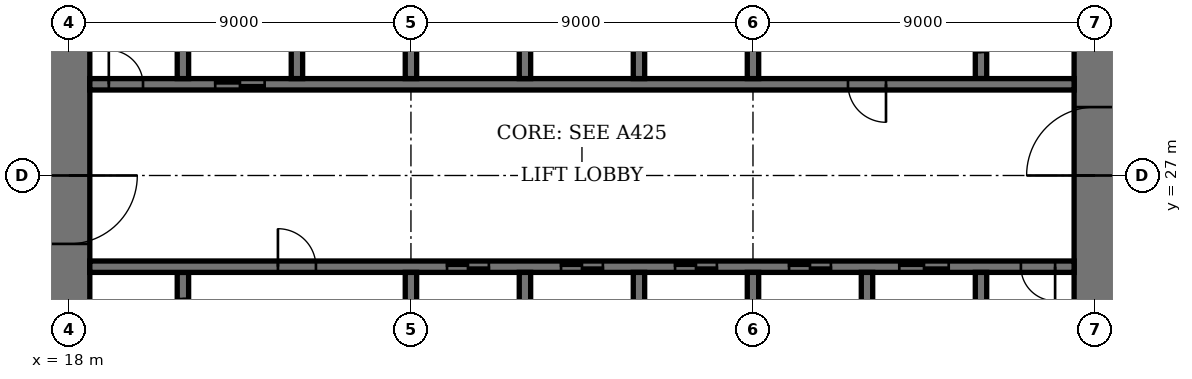
"""IFC4 building model, lengths in metres.
Left out: names, types, materials, properties, quantities, classifications, styles, units other than length and angle.
Written with IfcOpenShell. Run it as: python <this file> out.ifc"""

import sys

from ifc_helpers import new_model, si_unit, direction, frame, frame_2d, origin, place, context, subcontext, project, spatial, rectangle, extrude, element, fill, save


model = new_model("IFC4")
c1 = context("Model", 3, precision=1e-05, world=origin(), true_north=direction((0.0, 1.0)))
c2 = subcontext(c1, "Body", "Model", "MODEL_VIEW")
j1 = project(units=[si_unit("LENGTHUNIT", "METRE"), si_unit("PLANEANGLEUNIT", "RADIAN")], contexts=[c1])
p1 = place(None, origin())
s1 = spatial("IfcSite", under=j1, at=p1, CompositionType="ELEMENT")
p2 = place(p1, origin())
s2 = spatial("IfcBuilding", under=s1, at=p2, CompositionType="ELEMENT")
p3 = place(p2, frame((0.0, 0.0, 75.8)))
s3 = spatial("IfcBuildingStorey", under=s2, at=p3, CompositionType="ELEMENT", Elevation=75.8)
p4 = place(p3, frame((18.0, 35.45, 0.0), z_axis=(0.0, 0.0, 1.0), x_axis=(0.0, -1.0, 0.0)))
e1 = element("IfcWall", 1, at=p4, inside=s3, PredefinedType="SHEAR", context=c2, shape_type="SweptSolid", body=[
    extrude(rectangle(XDim=16.9, YDim=1.1, at=frame_2d((8.45, 0.0))), origin(), (0.0, 0.0, 1.0), 4.2),
])
p5 = place(p4, frame((8.45, 0.0, 0.0)))
e2 = element("IfcOpeningElement", 2, at=p5, cuts=e1, PredefinedType="OPENING", context=c2, shape_type="SweptSolid", body=[
    extrude(rectangle(XDim=1.8, YDim=2.4, at=frame_2d((0.9, 1.2))), frame((0.0, 0.56, 0.0), z_axis=(0.0, -1.0, 0.0), x_axis=(1.0, 0.0, 0.0)), (0.0, 0.0, 1.0), 1.12),
])
p6 = place(p3, frame((45.0, 18.55, 0.0), z_axis=(0.0, 0.0, 1.0), x_axis=(0.0, 1.0, 0.0)))
e3 = element("IfcWall", 3, at=p6, inside=s3, PredefinedType="SHEAR", context=c2, shape_type="SweptSolid", body=[
    extrude(rectangle(XDim=16.9, YDim=1.1, at=frame_2d((8.45, 0.0))), origin(), (0.0, 0.0, 1.0), 4.2),
])
p7 = place(p6, frame((8.45, 0.0, 0.0)))
e4 = element("IfcOpeningElement", 4, at=p7, cuts=e3, PredefinedType="OPENING", context=c2, shape_type="SweptSolid", body=[
    extrude(rectangle(XDim=1.8, YDim=2.4, at=frame_2d((0.9, 1.2))), frame((0.0, 0.56, 0.0), z_axis=(0.0, -1.0, 0.0), x_axis=(1.0, 0.0, 0.0)), (0.0, 0.0, 1.0), 1.12),
])
p8 = place(p3, frame((21.0, 21.95, 0.0), z_axis=(0.0, 0.0, 1.0), x_axis=(0.0, 1.0, 0.0)))
e5 = element("IfcWall", 5, at=p8, inside=s3, PredefinedType="SHEAR", context=c2, shape_type="SweptSolid", body=[
    extrude(rectangle(XDim=2.5, YDim=0.3, at=frame_2d((1.25, 0.0))), origin(), (0.0, 0.0, 1.0), 4.2),
])
p9 = place(p8, frame((0.7, 0.0, 0.0)))
e6 = element("IfcOpeningElement", 6, at=p9, cuts=e5, PredefinedType="OPENING", context=c2, shape_type="SweptSolid", body=[
    extrude(rectangle(XDim=1.1, YDim=2.4, at=frame_2d((0.55, 1.2))), frame((0.0, 0.16, 0.0), z_axis=(0.0, -1.0, 0.0), x_axis=(1.0, 0.0, 0.0)), (0.0, 0.0, 1.0), 0.32),
])
p10 = place(p3, frame((42.0, 29.55, 0.0), z_axis=(0.0, 0.0, 1.0), x_axis=(0.0, 1.0, 0.0)))
e7 = element("IfcWall", 7, at=p10, inside=s3, PredefinedType="SHEAR", context=c2, shape_type="SweptSolid", body=[
    extrude(rectangle(XDim=2.5, YDim=0.3, at=frame_2d((1.25, 0.0))), origin(), (0.0, 0.0, 1.0), 4.2),
])
p11 = place(p10, frame((0.7, 0.0, 0.0)))
e8 = element("IfcOpeningElement", 8, at=p11, cuts=e7, PredefinedType="OPENING", context=c2, shape_type="SweptSolid", body=[
    extrude(rectangle(XDim=1.1, YDim=2.4, at=frame_2d((0.55, 1.2))), frame((0.0, 0.16, 0.0), z_axis=(0.0, -1.0, 0.0), x_axis=(1.0, 0.0, 0.0)), (0.0, 0.0, 1.0), 0.32),
])
p12 = place(p3, frame((18.55, 24.6, 0.0), z_axis=(0.0, 0.0, 1.0), x_axis=(1.0, 0.0, 0.0)))
e9 = element("IfcWall", 9, at=p12, inside=s3, PredefinedType="SHEAR", context=c2, shape_type="SweptSolid", body=[
    extrude(rectangle(XDim=25.9, YDim=0.3, at=frame_2d((12.95, 0.0))), origin(), (0.0, 0.0, 1.0), 4.2),
])
p13 = place(p12, frame((4.95, 0.0, 0.0)))
e10 = element("IfcOpeningElement", 10, at=p13, cuts=e9, PredefinedType="OPENING", context=c2, shape_type="SweptSolid", body=[
    extrude(rectangle(XDim=1.0, YDim=2.4, at=frame_2d((0.5, 1.2))), frame((0.0, 0.16, 0.0), z_axis=(0.0, -1.0, 0.0), x_axis=(1.0, 0.0, 0.0)), (0.0, 0.0, 1.0), 0.32),
])
p14 = place(p12, frame((24.5, 0.0, 0.0)))
e11 = element("IfcOpeningElement", 11, at=p14, cuts=e9, PredefinedType="OPENING", context=c2, shape_type="SweptSolid", body=[
    extrude(rectangle(XDim=0.9, YDim=2.1, at=frame_2d((0.45, 1.05))), frame((0.0, 0.16, 0.0), z_axis=(0.0, -1.0, 0.0), x_axis=(1.0, 0.0, 0.0)), (0.0, 0.0, 1.0), 0.32),
])
p15 = place(p12, frame((9.4, 0.0, 0.0)))
e12 = element("IfcOpeningElement", 12, at=p15, cuts=e9, PredefinedType="OPENING", context=c2, shape_type="SweptSolid", body=[
    extrude(rectangle(XDim=1.1, YDim=2.4, at=frame_2d((0.55, 1.2))), frame((0.0, 0.16, 0.0), z_axis=(0.0, -1.0, 0.0), x_axis=(1.0, 0.0, 0.0)), (0.0, 0.0, 1.0), 0.32),
])
p16 = place(p12, frame((12.4, 0.0, 0.0)))
e13 = element("IfcOpeningElement", 13, at=p16, cuts=e9, PredefinedType="OPENING", context=c2, shape_type="SweptSolid", body=[
    extrude(rectangle(XDim=1.1, YDim=2.4, at=frame_2d((0.55, 1.2))), frame((0.0, 0.16, 0.0), z_axis=(0.0, -1.0, 0.0), x_axis=(1.0, 0.0, 0.0)), (0.0, 0.0, 1.0), 0.32),
])
p17 = place(p12, frame((15.4, 0.0, 0.0)))
e14 = element("IfcOpeningElement", 14, at=p17, cuts=e9, PredefinedType="OPENING", context=c2, shape_type="SweptSolid", body=[
    extrude(rectangle(XDim=1.1, YDim=2.4, at=frame_2d((0.55, 1.2))), frame((0.0, 0.16, 0.0), z_axis=(0.0, -1.0, 0.0), x_axis=(1.0, 0.0, 0.0)), (0.0, 0.0, 1.0), 0.32),
])
p18 = place(p12, frame((18.4, 0.0, 0.0)))
e15 = element("IfcOpeningElement", 15, at=p18, cuts=e9, PredefinedType="OPENING", context=c2, shape_type="SweptSolid", body=[
    extrude(rectangle(XDim=1.1, YDim=2.4, at=frame_2d((0.55, 1.2))), frame((0.0, 0.16, 0.0), z_axis=(0.0, -1.0, 0.0), x_axis=(1.0, 0.0, 0.0)), (0.0, 0.0, 1.0), 0.32),
])
p19 = place(p12, frame((21.3, 0.0, 0.0)))
e16 = element("IfcOpeningElement", 16, at=p19, cuts=e9, PredefinedType="OPENING", context=c2, shape_type="SweptSolid", body=[
    extrude(rectangle(XDim=1.3, YDim=2.4, at=frame_2d((0.65, 1.2))), frame((0.0, 0.16, 0.0), z_axis=(0.0, -1.0, 0.0), x_axis=(1.0, 0.0, 0.0)), (0.0, 0.0, 1.0), 0.32),
])
p20 = place(p3, frame((18.55, 29.4, 0.0), z_axis=(0.0, 0.0, 1.0), x_axis=(1.0, 0.0, 0.0)))
e17 = element("IfcWall", 17, at=p20, inside=s3, PredefinedType="SHEAR", context=c2, shape_type="SweptSolid", body=[
    extrude(rectangle(XDim=25.9, YDim=0.3, at=frame_2d((12.95, 0.0))), origin(), (0.0, 0.0, 1.0), 4.2),
])
p21 = place(p20, frame((19.95, 0.0, 0.0)))
e18 = element("IfcOpeningElement", 18, at=p21, cuts=e17, PredefinedType="OPENING", context=c2, shape_type="SweptSolid", body=[
    extrude(rectangle(XDim=1.0, YDim=2.4, at=frame_2d((0.5, 1.2))), frame((0.0, 0.16, 0.0), z_axis=(0.0, -1.0, 0.0), x_axis=(1.0, 0.0, 0.0)), (0.0, 0.0, 1.0), 0.32),
])
p22 = place(p20, frame((0.5, 0.0, 0.0)))
e19 = element("IfcOpeningElement", 19, at=p22, cuts=e17, PredefinedType="OPENING", context=c2, shape_type="SweptSolid", body=[
    extrude(rectangle(XDim=0.9, YDim=2.1, at=frame_2d((0.45, 1.05))), frame((0.0, 0.16, 0.0), z_axis=(0.0, -1.0, 0.0), x_axis=(1.0, 0.0, 0.0)), (0.0, 0.0, 1.0), 0.32),
])
p23 = place(p20, frame((3.3, 0.0, 0.0)))
e20 = element("IfcOpeningElement", 20, at=p23, cuts=e17, PredefinedType="OPENING", context=c2, shape_type="SweptSolid", body=[
    extrude(rectangle(XDim=1.3, YDim=2.4, at=frame_2d((0.65, 1.2))), frame((0.0, 0.16, 0.0), z_axis=(0.0, -1.0, 0.0), x_axis=(1.0, 0.0, 0.0)), (0.0, 0.0, 1.0), 0.32),
])
for number, where, z_axis, x_axis in (
    (21, (30.0, 21.75, 0.0), (0.0, 0.0, 1.0), (0.0, 1.0, 0.0)),
    (22, (33.0, 29.55, 0.0), (0.0, 0.0, 1.0), (0.0, 1.0, 0.0)),
    (23, (33.0, 21.75, 0.0), (0.0, 0.0, 1.0), (0.0, 1.0, 0.0)),
    (24, (30.0, 29.55, 0.0), (0.0, 0.0, 1.0), (0.0, 1.0, 0.0)),
    (25, (36.0, 21.75, 0.0), (0.0, 0.0, 1.0), (0.0, 1.0, 0.0)),
    (26, (27.0, 29.55, 0.0), (0.0, 0.0, 1.0), (0.0, 1.0, 0.0)),
):
    element("IfcWall", number, at=place(p3, frame(where, z_axis=z_axis, x_axis=x_axis)), inside=s3, PredefinedType="SHEAR", context=c2, shape_type="SweptSolid", body=[
        extrude(rectangle(XDim=2.7, YDim=0.3, at=frame_2d((1.35, 0.0))), origin(), (0.0, 0.0, 1.0), 4.2),
    ])
for number, where, z_axis, x_axis in (
    (27, (39.0, 18.55, 0.0), (0.0, 0.0, 1.0), (0.0, 1.0, 0.0)),
    (28, (24.0, 29.55, 0.0), (0.0, 0.0, 1.0), (0.0, 1.0, 0.0)),
):
    element("IfcWall", number, at=place(p3, frame(where, z_axis=z_axis, x_axis=x_axis)), inside=s3, PredefinedType="SHEAR", context=c2, shape_type="SweptSolid", body=[
        extrude(rectangle(XDim=5.9, YDim=0.3, at=frame_2d((2.95, 0.0))), origin(), (0.0, 0.0, 1.0), 4.2),
    ])
for number, where, z_axis, x_axis in (
    (29, (42.0, 21.75, 0.0), (0.0, 0.0, 1.0), (0.0, 1.0, 0.0)),
    (30, (21.0, 29.55, 0.0), (0.0, 0.0, 1.0), (0.0, 1.0, 0.0)),
):
    element("IfcWall", number, at=place(p3, frame(where, z_axis=z_axis, x_axis=x_axis)), inside=s3, PredefinedType="SHEAR", context=c2, shape_type="SweptSolid", body=[
        extrude(rectangle(XDim=2.7, YDim=0.3, at=frame_2d((1.35, 0.0))), origin(), (0.0, 0.0, 1.0), 4.2),
    ])
for number, where, z_axis, x_axis in (
    (31, (27.0, 21.6, 0.0), (0.0, 0.0, 1.0), (0.0, 1.0, 0.0)),
    (32, (36.0, 29.55, 0.0), (0.0, 0.0, 1.0), (0.0, 1.0, 0.0)),
):
    element("IfcWall", number, at=place(p3, frame(where, z_axis=z_axis, x_axis=x_axis)), inside=s3, PredefinedType="SHEAR", context=c2, shape_type="SweptSolid", body=[
        extrude(rectangle(XDim=2.85, YDim=0.3, at=frame_2d((1.425, 0.0))), origin(), (0.0, 0.0, 1.0), 4.2),
    ])
p24 = place(p5, origin())
e33 = element("IfcDoor", 33, at=p24, inside=s3, OperationType="DOUBLE_DOOR_DOUBLE_SWING", PredefinedType="DOOR", context=c2, shape_type="SweptSolid", body=[
    extrude(rectangle(XDim=1.8, YDim=2.4, at=frame_2d((0.9, 1.2))), frame((0.0, 0.03, 0.0), z_axis=(0.0, -1.0, 0.0), x_axis=(1.0, 0.0, 0.0)), (0.0, 0.0, 1.0), 0.06),
    extrude(rectangle(XDim=0.04, YDim=2.4, at=frame_2d((0.02, 1.2))), frame((0.0, 0.55, 0.0), z_axis=(0.0, -1.0, 0.0), x_axis=(1.0, 0.0, 0.0)), (0.0, 0.0, 1.0), 1.1),
    extrude(rectangle(XDim=0.04, YDim=2.4, at=frame_2d((1.78, 1.2))), frame((0.0, 0.55, 0.0), z_axis=(0.0, -1.0, 0.0), x_axis=(1.0, 0.0, 0.0)), (0.0, 0.0, 1.0), 1.1),
    extrude(rectangle(XDim=1.8, YDim=0.04, at=frame_2d((0.9, 2.38))), frame((0.0, 0.55, 0.0), z_axis=(0.0, -1.0, 0.0), x_axis=(1.0, 0.0, 0.0)), (0.0, 0.0, 1.0), 1.1),
])
fill(e2, e33)
p25 = place(p7, origin())
e34 = element("IfcDoor", 34, at=p25, inside=s3, OperationType="DOUBLE_DOOR_DOUBLE_SWING", PredefinedType="DOOR", context=c2, shape_type="SweptSolid", body=[
    extrude(rectangle(XDim=1.8, YDim=2.4, at=frame_2d((0.9, 1.2))), frame((0.0, 0.03, 0.0), z_axis=(0.0, -1.0, 0.0), x_axis=(1.0, 0.0, 0.0)), (0.0, 0.0, 1.0), 0.06),
    extrude(rectangle(XDim=0.04, YDim=2.4, at=frame_2d((0.02, 1.2))), frame((0.0, 0.55, 0.0), z_axis=(0.0, -1.0, 0.0), x_axis=(1.0, 0.0, 0.0)), (0.0, 0.0, 1.0), 1.1),
    extrude(rectangle(XDim=0.04, YDim=2.4, at=frame_2d((1.78, 1.2))), frame((0.0, 0.55, 0.0), z_axis=(0.0, -1.0, 0.0), x_axis=(1.0, 0.0, 0.0)), (0.0, 0.0, 1.0), 1.1),
    extrude(rectangle(XDim=1.8, YDim=0.04, at=frame_2d((0.9, 2.38))), frame((0.0, 0.55, 0.0), z_axis=(0.0, -1.0, 0.0), x_axis=(1.0, 0.0, 0.0)), (0.0, 0.0, 1.0), 1.1),
])
fill(e4, e34)
p26 = place(p13, origin())
e35 = element("IfcDoor", 35, at=p26, inside=s3, OperationType="SINGLE_SWING_RIGHT", PredefinedType="DOOR", context=c2, shape_type="SweptSolid", body=[
    extrude(rectangle(XDim=1.0, YDim=2.4, at=frame_2d((0.5, 1.2))), frame((0.0, 0.03, 0.0), z_axis=(0.0, -1.0, 0.0), x_axis=(1.0, 0.0, 0.0)), (0.0, 0.0, 1.0), 0.06),
])
fill(e10, e35)
p27 = place(p21, origin())
e36 = element("IfcDoor", 36, at=p27, inside=s3, OperationType="SINGLE_SWING_RIGHT", PredefinedType="DOOR", context=c2, shape_type="SweptSolid", body=[
    extrude(rectangle(XDim=1.0, YDim=2.4, at=frame_2d((0.5, 1.2))), frame((0.0, 0.03, 0.0), z_axis=(0.0, -1.0, 0.0), x_axis=(1.0, 0.0, 0.0)), (0.0, 0.0, 1.0), 0.06),
])
fill(e18, e36)
p28 = place(p14, origin())
e37 = element("IfcDoor", 37, at=p28, inside=s3, OperationType="SINGLE_SWING_RIGHT", PredefinedType="DOOR", context=c2, shape_type="SweptSolid", body=[
    extrude(rectangle(XDim=0.9, YDim=2.1, at=frame_2d((0.45, 1.05))), frame((0.0, 0.03, 0.0), z_axis=(0.0, -1.0, 0.0), x_axis=(1.0, 0.0, 0.0)), (0.0, 0.0, 1.0), 0.06),
])
fill(e11, e37)
p29 = place(p22, origin())
e38 = element("IfcDoor", 38, at=p29, inside=s3, OperationType="SINGLE_SWING_RIGHT", PredefinedType="DOOR", context=c2, shape_type="SweptSolid", body=[
    extrude(rectangle(XDim=0.9, YDim=2.1, at=frame_2d((0.45, 1.05))), frame((0.0, 0.03, 0.0), z_axis=(0.0, -1.0, 0.0), x_axis=(1.0, 0.0, 0.0)), (0.0, 0.0, 1.0), 0.06),
])
fill(e19, e38)
p30 = place(p15, origin())
e39 = element("IfcDoor", 39, at=p30, inside=s3, OperationType="DOUBLE_DOOR_SLIDING", PredefinedType="DOOR", context=c2, shape_type="SweptSolid", body=[
    extrude(rectangle(XDim=1.1, YDim=2.4, at=frame_2d((0.55, 1.2))), frame((0.0, 0.02, 0.0), z_axis=(0.0, -1.0, 0.0), x_axis=(1.0, 0.0, 0.0)), (0.0, 0.0, 1.0), 0.04),
])
fill(e12, e39)
p31 = place(p16, origin())
e40 = element("IfcDoor", 40, at=p31, inside=s3, OperationType="DOUBLE_DOOR_SLIDING", PredefinedType="DOOR", context=c2, shape_type="SweptSolid", body=[
    extrude(rectangle(XDim=1.1, YDim=2.4, at=frame_2d((0.55, 1.2))), frame((0.0, 0.02, 0.0), z_axis=(0.0, -1.0, 0.0), x_axis=(1.0, 0.0, 0.0)), (0.0, 0.0, 1.0), 0.04),
])
fill(e13, e40)
p32 = place(p17, origin())
e41 = element("IfcDoor", 41, at=p32, inside=s3, OperationType="DOUBLE_DOOR_SLIDING", PredefinedType="DOOR", context=c2, shape_type="SweptSolid", body=[
    extrude(rectangle(XDim=1.1, YDim=2.4, at=frame_2d((0.55, 1.2))), frame((0.0, 0.02, 0.0), z_axis=(0.0, -1.0, 0.0), x_axis=(1.0, 0.0, 0.0)), (0.0, 0.0, 1.0), 0.04),
])
fill(e14, e41)
p33 = place(p18, origin())
e42 = element("IfcDoor", 42, at=p33, inside=s3, OperationType="DOUBLE_DOOR_SLIDING", PredefinedType="DOOR", context=c2, shape_type="SweptSolid", body=[
    extrude(rectangle(XDim=1.1, YDim=2.4, at=frame_2d((0.55, 1.2))), frame((0.0, 0.02, 0.0), z_axis=(0.0, -1.0, 0.0), x_axis=(1.0, 0.0, 0.0)), (0.0, 0.0, 1.0), 0.04),
])
fill(e15, e42)
p34 = place(p19, origin())
e43 = element("IfcDoor", 43, at=p34, inside=s3, OperationType="DOUBLE_DOOR_SLIDING", PredefinedType="DOOR", context=c2, shape_type="SweptSolid", body=[
    extrude(rectangle(XDim=1.3, YDim=2.4, at=frame_2d((0.65, 1.2))), frame((0.0, 0.02, 0.0), z_axis=(0.0, -1.0, 0.0), x_axis=(1.0, 0.0, 0.0)), (0.0, 0.0, 1.0), 0.04),
])
fill(e16, e43)
p35 = place(p23, origin())
e44 = element("IfcDoor", 44, at=p35, inside=s3, OperationType="DOUBLE_DOOR_SLIDING", PredefinedType="DOOR", context=c2, shape_type="SweptSolid", body=[
    extrude(rectangle(XDim=1.3, YDim=2.4, at=frame_2d((0.65, 1.2))), frame((0.0, 0.02, 0.0), z_axis=(0.0, -1.0, 0.0), x_axis=(1.0, 0.0, 0.0)), (0.0, 0.0, 1.0), 0.04),
])
fill(e20, e44)
save(model, sys.argv[1])
